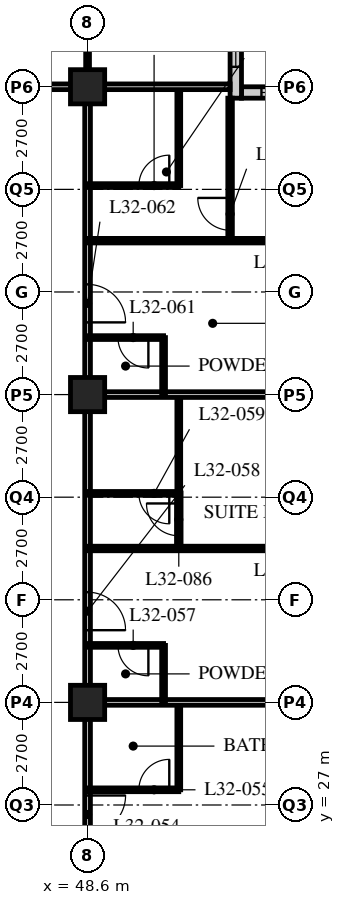
"""IFC4 building model, lengths in metres.
Left out: names, types, materials, properties, quantities, classifications, styles, units other than length and angle.
Written with IfcOpenShell. Run it as: python <this file> out.ifc"""

import sys

from ifc_helpers import new_model, si_unit, direction, frame, frame_2d, origin, origin_2d, place, context, subcontext, project, spatial, rectangle, hollow_rectangle, extrude, element, fill, save


model = new_model("IFC4")
c1 = context("Model", 3, precision=1e-05, world=origin(), true_north=direction((0.0, 1.0)))
c2 = subcontext(c1, "Body", "Model", "MODEL_VIEW")
j1 = project(units=[si_unit("LENGTHUNIT", "METRE"), si_unit("PLANEANGLEUNIT", "RADIAN")], contexts=[c1])
p1 = place(None, origin())
s1 = spatial("IfcSite", under=j1, at=p1, CompositionType="ELEMENT")
p2 = place(p1, origin())
s2 = spatial("IfcBuilding", under=s1, at=p2, CompositionType="ELEMENT")
p3 = place(p2, frame((0.0, 0.0, 127.2)))
s3 = spatial("IfcBuildingStorey", under=s2, at=p3, CompositionType="ELEMENT", Elevation=127.2)
for number, where, z_axis, x_axis in (
    (1, (48.6, 29.7, 0.0), (0.0, 0.0, 1.0), (1.0, 0.0, 0.0)),
    (2, (48.6, 37.8, 0.0), (0.0, 0.0, 1.0), (1.0, 0.0, 0.0)),
    (3, (48.6, 45.9, 0.0), (0.0, 0.0, 1.0), (1.0, 0.0, 0.0)),
):
    element("IfcColumn", number, at=place(p3, frame(where, z_axis=z_axis, x_axis=x_axis)), inside=s3, PredefinedType="COLUMN", context=c2, shape_type="SweptSolid", body=[
        extrude(hollow_rectangle(XDim=0.9, YDim=0.9, WallThickness=0.09, at=origin_2d()), origin(), (0.0, 0.0, 1.0), 3.4),
    ])
p4 = place(p3, frame((56.4, 45.75, 0.0), z_axis=(0.0, 0.0, 1.0), x_axis=(-1.0, 0.0, 0.0)))
e4 = element("IfcWall", 4, at=p4, inside=s3, PredefinedType="SOLIDWALL", context=c2, shape_type="SweptSolid", body=[
    extrude(rectangle(XDim=3.75, YDim=0.3, at=frame_2d((1.875, 0.0))), origin(), (0.0, 0.0, 1.0), 3.19),
])
p5 = place(p4, frame((0.225, 0.0, 0.9)))
e5 = element("IfcOpeningElement", 5, at=p5, cuts=e4, PredefinedType="OPENING", context=c2, shape_type="SweptSolid", body=[
    extrude(rectangle(XDim=3.0, YDim=1.5, at=frame_2d((1.5, 0.75))), frame((0.0, 0.16, 0.0), z_axis=(0.0, -1.0, 0.0), x_axis=(1.0, 0.0, 0.0)), (0.0, 0.0, 1.0), 0.32),
])
p6 = place(p3, frame((52.5, 45.6, 0.0), z_axis=(0.0, 0.0, 1.0), x_axis=(0.0, 1.0, 0.0)))
e6 = element("IfcWall", 6, at=p6, inside=s3, PredefinedType="SOLIDWALL", context=c2, shape_type="SweptSolid", body=[
    extrude(rectangle(XDim=4.35, YDim=0.3, at=frame_2d((2.175, 0.0))), origin(), (0.0, 0.0, 1.0), 3.19),
])
p7 = place(p6, frame((0.825, 0.0, 0.9)))
e7 = element("IfcOpeningElement", 7, at=p7, cuts=e6, PredefinedType="OPENING", context=c2, shape_type="SweptSolid", body=[
    extrude(rectangle(XDim=3.0, YDim=1.5, at=frame_2d((1.5, 0.75))), frame((0.0, 0.16, 0.0), z_axis=(0.0, -1.0, 0.0), x_axis=(1.0, 0.0, 0.0)), (0.0, 0.0, 1.0), 0.32),
])
p8 = place(p3, frame((8.1, 45.9, 0.0), z_axis=(0.0, 0.0, 1.0), x_axis=(1.0, 0.0, 0.0)))
e8 = element("IfcWall", 8, at=p8, inside=s3, PredefinedType="PARTITIONING", context=c2, shape_type="SweptSolid", body=[
    extrude(rectangle(XDim=40.5, YDim=0.15, at=frame_2d((20.25, 0.0))), origin(), (0.0, 0.0, 1.0), 2.578),
])
p9 = place(p8, frame((9.625, 0.0, 0.0)))
e9 = element("IfcOpeningElement", 9, at=p9, cuts=e8, PredefinedType="OPENING", context=c2, shape_type="SweptSolid", body=[
    extrude(rectangle(XDim=1.0, YDim=2.1, at=frame_2d((0.5, 1.05))), frame((0.0, 0.085, 0.0), z_axis=(0.0, -1.0, 0.0), x_axis=(1.0, 0.0, 0.0)), (0.0, 0.0, 1.0), 0.17),
])
p10 = place(p8, frame((21.65, 0.0, 0.0)))
e10 = element("IfcOpeningElement", 10, at=p10, cuts=e8, PredefinedType="OPENING", context=c2, shape_type="SweptSolid", body=[
    extrude(rectangle(XDim=1.0, YDim=2.1, at=frame_2d((0.5, 1.05))), frame((0.0, 0.085, 0.0), z_axis=(0.0, -1.0, 0.0), x_axis=(1.0, 0.0, 0.0)), (0.0, 0.0, 1.0), 0.17),
])
p11 = place(p8, frame((26.75, 0.0, 0.0)))
e11 = element("IfcOpeningElement", 11, at=p11, cuts=e8, PredefinedType="OPENING", context=c2, shape_type="SweptSolid", body=[
    extrude(rectangle(XDim=1.0, YDim=2.1, at=frame_2d((0.5, 1.05))), frame((0.0, 0.085, 0.0), z_axis=(0.0, -1.0, 0.0), x_axis=(1.0, 0.0, 0.0)), (0.0, 0.0, 1.0), 0.17),
])
p12 = place(p8, frame((28.95, 0.0, 0.0)))
e12 = element("IfcOpeningElement", 12, at=p12, cuts=e8, PredefinedType="OPENING", context=c2, shape_type="SweptSolid", body=[
    extrude(rectangle(XDim=1.0, YDim=2.1, at=frame_2d((0.5, 1.05))), frame((0.0, 0.085, 0.0), z_axis=(0.0, -1.0, 0.0), x_axis=(1.0, 0.0, 0.0)), (0.0, 0.0, 1.0), 0.17),
])
p13 = place(p8, frame((34.85, 0.0, 0.0)))
e13 = element("IfcOpeningElement", 13, at=p13, cuts=e8, PredefinedType="OPENING", context=c2, shape_type="SweptSolid", body=[
    extrude(rectangle(XDim=1.0, YDim=2.1, at=frame_2d((0.5, 1.05))), frame((0.0, 0.085, 0.0), z_axis=(0.0, -1.0, 0.0), x_axis=(1.0, 0.0, 0.0)), (0.0, 0.0, 1.0), 0.17),
])
p14 = place(p8, frame((36.875, 0.0, 0.0)))
e14 = element("IfcOpeningElement", 14, at=p14, cuts=e8, PredefinedType="OPENING", context=c2, shape_type="SweptSolid", body=[
    extrude(rectangle(XDim=1.0, YDim=2.1, at=frame_2d((0.5, 1.05))), frame((0.0, 0.085, 0.0), z_axis=(0.0, -1.0, 0.0), x_axis=(1.0, 0.0, 0.0)), (0.0, 0.0, 1.0), 0.17),
])
p15 = place(p8, frame((2.625, 0.0, 0.0)))
e15 = element("IfcOpeningElement", 15, at=p15, cuts=e8, PredefinedType="OPENING", context=c2, shape_type="SweptSolid", body=[
    extrude(rectangle(XDim=1.0, YDim=2.1, at=frame_2d((0.5, 1.05))), frame((0.0, 0.085, 0.0), z_axis=(0.0, -1.0, 0.0), x_axis=(1.0, 0.0, 0.0)), (0.0, 0.0, 1.0), 0.17),
])
p16 = place(p3, frame((48.6, 21.6, 0.0), z_axis=(0.0, 0.0, 1.0), x_axis=(0.0, 1.0, 0.0)))
e16 = element("IfcWall", 16, at=p16, inside=s3, PredefinedType="PARTITIONING", context=c2, shape_type="SweptSolid", body=[
    extrude(rectangle(XDim=24.3, YDim=0.15, at=frame_2d((12.15, 0.0))), origin(), (0.0, 0.0, 1.0), 2.578),
])
p17 = place(p16, frame((2.75, 0.0, 0.0)))
e17 = element("IfcOpeningElement", 17, at=p17, cuts=e16, PredefinedType="OPENING", context=c2, shape_type="SweptSolid", body=[
    extrude(rectangle(XDim=1.0, YDim=2.1, at=frame_2d((0.5, 1.05))), frame((0.0, 0.085, 0.0), z_axis=(0.0, -1.0, 0.0), x_axis=(1.0, 0.0, 0.0)), (0.0, 0.0, 1.0), 0.17),
])
p18 = place(p16, frame((4.65, 0.0, 0.0)))
e18 = element("IfcOpeningElement", 18, at=p18, cuts=e16, PredefinedType="OPENING", context=c2, shape_type="SweptSolid", body=[
    extrude(rectangle(XDim=1.0, YDim=2.1, at=frame_2d((0.5, 1.05))), frame((0.0, 0.085, 0.0), z_axis=(0.0, -1.0, 0.0), x_axis=(1.0, 0.0, 0.0)), (0.0, 0.0, 1.0), 0.17),
])
p19 = place(p16, frame((10.0, 0.0, 0.0)))
e19 = element("IfcOpeningElement", 19, at=p19, cuts=e16, PredefinedType="OPENING", context=c2, shape_type="SweptSolid", body=[
    extrude(rectangle(XDim=1.0, YDim=2.1, at=frame_2d((0.5, 1.05))), frame((0.0, 0.085, 0.0), z_axis=(0.0, -1.0, 0.0), x_axis=(1.0, 0.0, 0.0)), (0.0, 0.0, 1.0), 0.17),
])
p20 = place(p16, frame((18.1, 0.0, 0.0)))
e20 = element("IfcOpeningElement", 20, at=p20, cuts=e16, PredefinedType="OPENING", context=c2, shape_type="SweptSolid", body=[
    extrude(rectangle(XDim=1.0, YDim=2.1, at=frame_2d((0.5, 1.05))), frame((0.0, 0.085, 0.0), z_axis=(0.0, -1.0, 0.0), x_axis=(1.0, 0.0, 0.0)), (0.0, 0.0, 1.0), 0.17),
])
p21 = place(p3, frame((51.0, 27.4, 0.0), z_axis=(0.0, 0.0, 1.0), x_axis=(0.0, 1.0, 0.0)))
e21 = element("IfcWall", 21, at=p21, inside=s3, PredefinedType="PARTITIONING", context=c2, shape_type="SweptSolid", body=[
    extrude(rectangle(XDim=2.3, YDim=0.1, at=frame_2d((1.15, 0.0))), origin(), (0.0, 0.0, 1.0), 3.19),
])
p22 = place(p3, frame((48.6, 27.4, 0.0), z_axis=(0.0, 0.0, 1.0), x_axis=(1.0, 0.0, 0.0)))
e22 = element("IfcWall", 22, at=p22, inside=s3, PredefinedType="PARTITIONING", context=c2, shape_type="SweptSolid", body=[
    extrude(rectangle(XDim=2.4, YDim=0.1, at=frame_2d((1.2, 0.0))), origin(), (0.0, 0.0, 1.0), 3.19),
])
p23 = place(p22, frame((1.35, 0.0, 0.0)))
e23 = element("IfcOpeningElement", 23, at=p23, cuts=e22, PredefinedType="OPENING", context=c2, shape_type="SweptSolid", body=[
    extrude(rectangle(XDim=0.8, YDim=2.1, at=frame_2d((0.4, 1.05))), frame((0.0, 0.06, 0.0), z_axis=(0.0, -1.0, 0.0), x_axis=(1.0, 0.0, 0.0)), (0.0, 0.0, 1.0), 0.12),
])
p24 = place(p3, frame((48.6, 29.7, 0.0), z_axis=(0.0, 0.0, 1.0), x_axis=(1.0, 0.0, 0.0)))
e24 = element("IfcWall", 24, at=p24, inside=s3, PredefinedType="PARTITIONING", context=c2, shape_type="SweptSolid", body=[
    extrude(rectangle(XDim=7.8, YDim=0.15, at=frame_2d((3.9, 0.0))), origin(), (0.0, 0.0, 1.0), 2.578),
])
p25 = place(p3, frame((50.6, 29.7, 0.0), z_axis=(0.0, 0.0, 1.0), x_axis=(0.0, 1.0, 0.0)))
e25 = element("IfcWall", 25, at=p25, inside=s3, PredefinedType="PARTITIONING", context=c2, shape_type="SweptSolid", body=[
    extrude(rectangle(XDim=1.5, YDim=0.1, at=frame_2d((0.75, 0.0))), origin(), (0.0, 0.0, 1.0), 3.19),
])
p26 = place(p3, frame((48.6, 31.2, 0.0), z_axis=(0.0, 0.0, 1.0), x_axis=(1.0, 0.0, 0.0)))
e26 = element("IfcWall", 26, at=p26, inside=s3, PredefinedType="PARTITIONING", context=c2, shape_type="SweptSolid", body=[
    extrude(rectangle(XDim=2.0, YDim=0.1, at=frame_2d((1.0, 0.0))), origin(), (0.0, 0.0, 1.0), 3.19),
])
p27 = place(p26, frame((0.8, 0.0, 0.0)))
e27 = element("IfcOpeningElement", 27, at=p27, cuts=e26, PredefinedType="OPENING", context=c2, shape_type="SweptSolid", body=[
    extrude(rectangle(XDim=0.8, YDim=2.1, at=frame_2d((0.4, 1.05))), frame((0.0, 0.06, 0.0), z_axis=(0.0, -1.0, 0.0), x_axis=(1.0, 0.0, 0.0)), (0.0, 0.0, 1.0), 0.12),
])
p28 = place(p3, frame((51.0, 35.2, 0.0), z_axis=(0.0, 0.0, 1.0), x_axis=(0.0, 1.0, 0.0)))
e28 = element("IfcWall", 28, at=p28, inside=s3, PredefinedType="PARTITIONING", context=c2, shape_type="SweptSolid", body=[
    extrude(rectangle(XDim=2.6, YDim=0.1, at=frame_2d((1.3, 0.0))), origin(), (0.0, 0.0, 1.0), 3.19),
])
p29 = place(p3, frame((48.6, 35.2, 0.0), z_axis=(0.0, 0.0, 1.0), x_axis=(1.0, 0.0, 0.0)))
e29 = element("IfcWall", 29, at=p29, inside=s3, PredefinedType="PARTITIONING", context=c2, shape_type="SweptSolid", body=[
    extrude(rectangle(XDim=2.4, YDim=0.1, at=frame_2d((1.2, 0.0))), origin(), (0.0, 0.0, 1.0), 3.19),
])
p30 = place(p29, frame((1.35, 0.0, 0.0)))
e30 = element("IfcOpeningElement", 30, at=p30, cuts=e29, PredefinedType="OPENING", context=c2, shape_type="SweptSolid", body=[
    extrude(rectangle(XDim=0.8, YDim=2.1, at=frame_2d((0.4, 1.05))), frame((0.0, 0.06, 0.0), z_axis=(0.0, -1.0, 0.0), x_axis=(1.0, 0.0, 0.0)), (0.0, 0.0, 1.0), 0.12),
])
p31 = place(p3, frame((48.6, 33.75, 0.0), z_axis=(0.0, 0.0, 1.0), x_axis=(1.0, 0.0, 0.0)))
e31 = element("IfcWall", 31, at=p31, inside=s3, PredefinedType="PARTITIONING", context=c2, shape_type="SweptSolid", body=[
    extrude(rectangle(XDim=7.8, YDim=0.12, at=frame_2d((3.9, 0.0))), origin(), (0.0, 0.0, 1.0), 3.19),
])
p32 = place(p31, frame((4.825, 0.0, 0.0)))
e32 = element("IfcOpeningElement", 32, at=p32, cuts=e31, PredefinedType="OPENING", context=c2, shape_type="SweptSolid", body=[
    extrude(rectangle(XDim=0.85, YDim=2.1, at=frame_2d((0.425, 1.05))), frame((0.0, 0.07, 0.0), z_axis=(0.0, -1.0, 0.0), x_axis=(1.0, 0.0, 0.0)), (0.0, 0.0, 1.0), 0.14),
])
p33 = place(p3, frame((48.6, 37.8, 0.0), z_axis=(0.0, 0.0, 1.0), x_axis=(1.0, 0.0, 0.0)))
e33 = element("IfcWall", 33, at=p33, inside=s3, PredefinedType="PARTITIONING", context=c2, shape_type="SweptSolid", body=[
    extrude(rectangle(XDim=7.8, YDim=0.15, at=frame_2d((3.9, 0.0))), origin(), (0.0, 0.0, 1.0), 2.578),
])
p34 = place(p3, frame((50.6, 37.8, 0.0), z_axis=(0.0, 0.0, 1.0), x_axis=(0.0, 1.0, 0.0)))
e34 = element("IfcWall", 34, at=p34, inside=s3, PredefinedType="PARTITIONING", context=c2, shape_type="SweptSolid", body=[
    extrude(rectangle(XDim=1.5, YDim=0.1, at=frame_2d((0.75, 0.0))), origin(), (0.0, 0.0, 1.0), 3.19),
])
p35 = place(p3, frame((48.6, 39.3, 0.0), z_axis=(0.0, 0.0, 1.0), x_axis=(1.0, 0.0, 0.0)))
e35 = element("IfcWall", 35, at=p35, inside=s3, PredefinedType="PARTITIONING", context=c2, shape_type="SweptSolid", body=[
    extrude(rectangle(XDim=2.0, YDim=0.1, at=frame_2d((1.0, 0.0))), origin(), (0.0, 0.0, 1.0), 3.19),
])
p36 = place(p35, frame((0.8, 0.0, 0.0)))
e36 = element("IfcOpeningElement", 36, at=p36, cuts=e35, PredefinedType="OPENING", context=c2, shape_type="SweptSolid", body=[
    extrude(rectangle(XDim=0.8, YDim=2.1, at=frame_2d((0.4, 1.05))), frame((0.0, 0.06, 0.0), z_axis=(0.0, -1.0, 0.0), x_axis=(1.0, 0.0, 0.0)), (0.0, 0.0, 1.0), 0.12),
])
p37 = place(p3, frame((51.0, 43.3, 0.0), z_axis=(0.0, 0.0, 1.0), x_axis=(0.0, 1.0, 0.0)))
e37 = element("IfcWall", 37, at=p37, inside=s3, PredefinedType="PARTITIONING", context=c2, shape_type="SweptSolid", body=[
    extrude(rectangle(XDim=2.6, YDim=0.1, at=frame_2d((1.3, 0.0))), origin(), (0.0, 0.0, 1.0), 3.19),
])
p38 = place(p3, frame((48.6, 43.3, 0.0), z_axis=(0.0, 0.0, 1.0), x_axis=(1.0, 0.0, 0.0)))
e38 = element("IfcWall", 38, at=p38, inside=s3, PredefinedType="PARTITIONING", context=c2, shape_type="SweptSolid", body=[
    extrude(rectangle(XDim=2.4, YDim=0.1, at=frame_2d((1.2, 0.0))), origin(), (0.0, 0.0, 1.0), 3.19),
])
p39 = place(p38, frame((1.35, 0.0, 0.0)))
e39 = element("IfcOpeningElement", 39, at=p39, cuts=e38, PredefinedType="OPENING", context=c2, shape_type="SweptSolid", body=[
    extrude(rectangle(XDim=0.8, YDim=2.1, at=frame_2d((0.4, 1.05))), frame((0.0, 0.06, 0.0), z_axis=(0.0, -1.0, 0.0), x_axis=(1.0, 0.0, 0.0)), (0.0, 0.0, 1.0), 0.12),
])
p40 = place(p3, frame((48.6, 41.85, 0.0), z_axis=(0.0, 0.0, 1.0), x_axis=(1.0, 0.0, 0.0)))
e40 = element("IfcWall", 40, at=p40, inside=s3, PredefinedType="PARTITIONING", context=c2, shape_type="SweptSolid", body=[
    extrude(rectangle(XDim=7.8, YDim=0.12, at=frame_2d((3.9, 0.0))), origin(), (0.0, 0.0, 1.0), 3.19),
])
p41 = place(p40, frame((4.825, 0.0, 0.0)))
e41 = element("IfcOpeningElement", 41, at=p41, cuts=e40, PredefinedType="OPENING", context=c2, shape_type="SweptSolid", body=[
    extrude(rectangle(XDim=0.85, YDim=2.1, at=frame_2d((0.425, 1.05))), frame((0.0, 0.07, 0.0), z_axis=(0.0, -1.0, 0.0), x_axis=(1.0, 0.0, 0.0)), (0.0, 0.0, 1.0), 0.14),
])
p42 = place(p3, frame((48.6, 45.9, 0.0), z_axis=(0.0, 0.0, 1.0), x_axis=(0.0, 1.0, 0.0)))
e42 = element("IfcWall", 42, at=p42, inside=s3, PredefinedType="PARTITIONING", context=c2, shape_type="SweptSolid", body=[
    extrude(rectangle(XDim=2.4, YDim=0.1, at=frame_2d((1.2, 0.0))), origin(), (0.0, 0.0, 1.0), 2.578),
])
p43 = place(p3, frame((48.6, 45.9, 0.0), z_axis=(0.0, 0.0, 1.0), x_axis=(1.0, 0.0, 0.0)))
e43 = element("IfcWall", 43, at=p43, inside=s3, PredefinedType="PARTITIONING", context=c2, shape_type="SweptSolid", body=[
    extrude(rectangle(XDim=3.75, YDim=0.15, at=frame_2d((1.875, 0.0))), origin(), (0.0, 0.0, 1.0), 2.578),
])
p44 = place(p3, frame((51.0, 35.21, 0.0), z_axis=(0.0, 0.0, 1.0), x_axis=(0.0, -1.0, 0.0)))
e44 = element("IfcWall", 44, at=p44, inside=s3, PredefinedType="PARTITIONING", context=c2, shape_type="SweptSolid", body=[
    extrude(rectangle(XDim=1.46, YDim=0.12, at=frame_2d((0.73, 0.0))), origin(), (0.0, 0.0, 1.0), 3.19),
])
p45 = place(p44, frame((0.275, 0.0, 0.0)))
e45 = element("IfcOpeningElement", 45, at=p45, cuts=e44, PredefinedType="OPENING", context=c2, shape_type="SweptSolid", body=[
    extrude(rectangle(XDim=0.85, YDim=2.1, at=frame_2d((0.425, 1.05))), frame((0.0, 0.07, 0.0), z_axis=(0.0, -1.0, 0.0), x_axis=(1.0, 0.0, 0.0)), (0.0, 0.0, 1.0), 0.14),
])
p46 = place(p3, frame((52.35, 45.6, 0.0), z_axis=(0.0, 0.0, 1.0), x_axis=(0.0, -1.0, 0.0)))
e46 = element("IfcWall", 46, at=p46, inside=s3, PredefinedType="PARTITIONING", context=c2, shape_type="SweptSolid", body=[
    extrude(rectangle(XDim=3.75, YDim=0.12, at=frame_2d((1.875, 0.0))), origin(), (0.0, 0.0, 1.0), 3.19),
])
p47 = place(p46, frame((2.625, 0.0, 0.0)))
e47 = element("IfcOpeningElement", 47, at=p47, cuts=e46, PredefinedType="OPENING", context=c2, shape_type="SweptSolid", body=[
    extrude(rectangle(XDim=0.85, YDim=2.1, at=frame_2d((0.425, 1.05))), frame((0.0, 0.07, 0.0), z_axis=(0.0, -1.0, 0.0), x_axis=(1.0, 0.0, 0.0)), (0.0, 0.0, 1.0), 0.14),
])
p48 = place(p5, origin())
e48 = element("IfcWindow", 48, at=p48, inside=s3, PartitioningType="SINGLE_PANEL", PredefinedType="WINDOW", context=c2, shape_type="SweptSolid", body=[
    extrude(rectangle(XDim=3.0, YDim=1.5, at=frame_2d((1.5, 0.75))), frame((0.0, 0.03, 0.0), z_axis=(0.0, -1.0, 0.0), x_axis=(1.0, 0.0, 0.0)), (0.0, 0.0, 1.0), 0.06),
])
fill(e5, e48)
p49 = place(p7, origin())
e49 = element("IfcWindow", 49, at=p49, inside=s3, PartitioningType="SINGLE_PANEL", PredefinedType="WINDOW", context=c2, shape_type="SweptSolid", body=[
    extrude(rectangle(XDim=3.0, YDim=1.5, at=frame_2d((1.5, 0.75))), frame((0.0, 0.03, 0.0), z_axis=(0.0, -1.0, 0.0), x_axis=(1.0, 0.0, 0.0)), (0.0, 0.0, 1.0), 0.06),
])
fill(e7, e49)
p50 = place(p23, origin())
e50 = element("IfcDoor", 50, at=p50, inside=s3, OperationType="SINGLE_SWING_RIGHT", PredefinedType="DOOR", context=c2, shape_type="SweptSolid", body=[
    extrude(rectangle(XDim=0.8, YDim=2.1, at=frame_2d((0.4, 1.05))), frame((0.0, 0.025, 0.0), z_axis=(0.0, -1.0, 0.0), x_axis=(1.0, 0.0, 0.0)), (0.0, 0.0, 1.0), 0.05),
])
fill(e23, e50)
p51 = place(p18, origin())
e51 = element("IfcDoor", 51, at=p51, inside=s3, OperationType="SINGLE_SWING_LEFT", PredefinedType="DOOR", context=c2, shape_type="SweptSolid", body=[
    extrude(rectangle(XDim=1.0, YDim=2.1, at=frame_2d((0.5, 1.05))), frame((0.0, 0.025, 0.0), z_axis=(0.0, -1.0, 0.0), x_axis=(1.0, 0.0, 0.0)), (0.0, 0.0, 1.0), 0.05),
])
fill(e18, e51)
p52 = place(p27, origin())
e52 = element("IfcDoor", 52, at=p52, inside=s3, OperationType="SINGLE_SWING_LEFT", PredefinedType="DOOR", context=c2, shape_type="SweptSolid", body=[
    extrude(rectangle(XDim=0.8, YDim=2.1, at=frame_2d((0.4, 1.05))), frame((0.0, 0.025, 0.0), z_axis=(0.0, -1.0, 0.0), x_axis=(1.0, 0.0, 0.0)), (0.0, 0.0, 1.0), 0.05),
])
fill(e27, e52)
p53 = place(p19, origin())
e53 = element("IfcDoor", 53, at=p53, inside=s3, OperationType="SINGLE_SWING_RIGHT", PredefinedType="DOOR", context=c2, shape_type="SweptSolid", body=[
    extrude(rectangle(XDim=1.0, YDim=2.1, at=frame_2d((0.5, 1.05))), frame((0.0, 0.025, 0.0), z_axis=(0.0, -1.0, 0.0), x_axis=(1.0, 0.0, 0.0)), (0.0, 0.0, 1.0), 0.05),
])
fill(e19, e53)
p54 = place(p30, origin())
e54 = element("IfcDoor", 54, at=p54, inside=s3, OperationType="SINGLE_SWING_LEFT", PredefinedType="DOOR", context=c2, shape_type="SweptSolid", body=[
    extrude(rectangle(XDim=0.8, YDim=2.1, at=frame_2d((0.4, 1.05))), frame((0.0, 0.025, 0.0), z_axis=(0.0, -1.0, 0.0), x_axis=(1.0, 0.0, 0.0)), (0.0, 0.0, 1.0), 0.05),
])
fill(e30, e54)
p55 = place(p36, origin())
e55 = element("IfcDoor", 55, at=p55, inside=s3, OperationType="SINGLE_SWING_LEFT", PredefinedType="DOOR", context=c2, shape_type="SweptSolid", body=[
    extrude(rectangle(XDim=0.8, YDim=2.1, at=frame_2d((0.4, 1.05))), frame((0.0, 0.025, 0.0), z_axis=(0.0, -1.0, 0.0), x_axis=(1.0, 0.0, 0.0)), (0.0, 0.0, 1.0), 0.05),
])
fill(e36, e55)
p56 = place(p20, origin())
e56 = element("IfcDoor", 56, at=p56, inside=s3, OperationType="SINGLE_SWING_RIGHT", PredefinedType="DOOR", context=c2, shape_type="SweptSolid", body=[
    extrude(rectangle(XDim=1.0, YDim=2.1, at=frame_2d((0.5, 1.05))), frame((0.0, 0.025, 0.0), z_axis=(0.0, -1.0, 0.0), x_axis=(1.0, 0.0, 0.0)), (0.0, 0.0, 1.0), 0.05),
])
fill(e20, e56)
p57 = place(p39, origin())
e57 = element("IfcDoor", 57, at=p57, inside=s3, OperationType="SINGLE_SWING_RIGHT", PredefinedType="DOOR", context=c2, shape_type="SweptSolid", body=[
    extrude(rectangle(XDim=0.8, YDim=2.1, at=frame_2d((0.4, 1.05))), frame((0.0, 0.025, 0.0), z_axis=(0.0, -1.0, 0.0), x_axis=(1.0, 0.0, 0.0)), (0.0, 0.0, 1.0), 0.05),
])
fill(e39, e57)
p58 = place(p45, origin())
e58 = element("IfcDoor", 58, at=p58, inside=s3, OperationType="SINGLE_SWING_RIGHT", PredefinedType="DOOR", context=c2, shape_type="SweptSolid", body=[
    extrude(rectangle(XDim=0.85, YDim=2.1, at=frame_2d((0.425, 1.05))), frame((0.0, 0.025, 0.0), z_axis=(0.0, -1.0, 0.0), x_axis=(1.0, 0.0, 0.0)), (0.0, 0.0, 1.0), 0.05),
])
fill(e45, e58)
p59 = place(p47, origin())
e59 = element("IfcDoor", 59, at=p59, inside=s3, OperationType="SINGLE_SWING_RIGHT", PredefinedType="DOOR", context=c2, shape_type="SweptSolid", body=[
    extrude(rectangle(XDim=0.85, YDim=2.1, at=frame_2d((0.425, 1.05))), frame((0.0, 0.025, 0.0), z_axis=(0.0, -1.0, 0.0), x_axis=(1.0, 0.0, 0.0)), (0.0, 0.0, 1.0), 0.05),
])
fill(e47, e59)
save(model, sys.argv[1])
